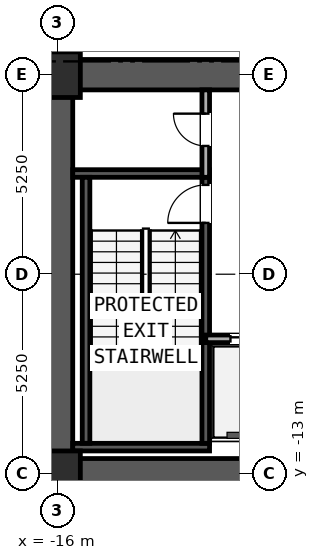
"""IFC4 building model, lengths in metres.
Left out: names, types, materials, properties, quantities, classifications, styles, units other than length and angle.
Written with IfcOpenShell. Run it as: python <this file> out.ifc"""

import sys

from ifc_helpers import new_model, si_unit, direction, frame, frame_2d, origin, origin_2d, place, context, subcontext, project, spatial, rectangle, extrude, element, fill, save


model = new_model("IFC4")
c1 = context("Model", 3, precision=1e-05, world=origin(), true_north=direction((0.0, 1.0)))
c2 = subcontext(c1, "Body", "Model", "MODEL_VIEW")
j1 = project(units=[si_unit("LENGTHUNIT", "METRE"), si_unit("PLANEANGLEUNIT", "RADIAN")], contexts=[c1])
p1 = place(None, origin())
s1 = spatial("IfcSite", under=j1, at=p1, CompositionType="ELEMENT")
p2 = place(p1, origin())
s2 = spatial("IfcBuilding", under=s1, at=p2, CompositionType="ELEMENT")
p3 = place(p2, frame((0.0, 0.0, -10.0)))
s3 = spatial("IfcBuildingStorey", under=s2, at=p3, CompositionType="ELEMENT", Elevation=-10.0)
p4 = place(p3, frame((-16.4, -13.0, 0.0), z_axis=(0.0, 0.0, 1.0), x_axis=(1.0, 0.0, 0.0)))
e1 = element("IfcWall", 1, at=p4, inside=s3, PredefinedType="SHEAR", context=c2, shape_type="SweptSolid", body=[
    extrude(rectangle(XDim=32.8, YDim=0.8, at=frame_2d((16.4, 0.0))), origin(), (0.0, 0.0, 1.0), 4.2),
])
p5 = place(p3, frame((-16.4, -2.5, 0.0), z_axis=(0.0, 0.0, 1.0), x_axis=(1.0, 0.0, 0.0)))
e2 = element("IfcWall", 2, at=p5, inside=s3, PredefinedType="SHEAR", context=c2, shape_type="SweptSolid", body=[
    extrude(rectangle(XDim=32.8, YDim=0.8, at=frame_2d((16.4, 0.0))), origin(), (0.0, 0.0, 1.0), 4.2),
])
p6 = place(p5, frame((6.025, 0.0, 0.0)))
e3 = element("IfcOpeningElement", 3, at=p6, cuts=e2, PredefinedType="OPENING", context=c2, shape_type="SweptSolid", body=[
    extrude(rectangle(XDim=1.15, YDim=2.0, at=frame_2d((0.575, 1.0))), frame((0.0, 0.41, 0.0), z_axis=(0.0, -1.0, 0.0), x_axis=(1.0, 0.0, 0.0)), (0.0, 0.0, 1.0), 0.82),
])
p7 = place(p5, frame((15.6, 0.0, 0.0)))
e4 = element("IfcOpeningElement", 4, at=p7, cuts=e2, PredefinedType="OPENING", context=c2, shape_type="SweptSolid", body=[
    extrude(rectangle(XDim=1.6, YDim=2.0, at=frame_2d((0.8, 1.0))), frame((0.0, 0.41, 0.0), z_axis=(0.0, -1.0, 0.0), x_axis=(1.0, 0.0, 0.0)), (0.0, 0.0, 1.0), 0.82),
])
p8 = place(p5, frame((25.625, 0.0, 0.0)))
e5 = element("IfcOpeningElement", 5, at=p8, cuts=e2, PredefinedType="OPENING", context=c2, shape_type="SweptSolid", body=[
    extrude(rectangle(XDim=1.15, YDim=2.0, at=frame_2d((0.575, 1.0))), frame((0.0, 0.41, 0.0), z_axis=(0.0, -1.0, 0.0), x_axis=(1.0, 0.0, 0.0)), (0.0, 0.0, 1.0), 0.82),
])
p9 = place(p3, frame((-16.0, -12.6, 0.0), z_axis=(0.0, 0.0, 1.0), x_axis=(0.0, 1.0, 0.0)))
e6 = element("IfcWall", 6, at=p9, inside=s3, PredefinedType="SHEAR", context=c2, shape_type="SweptSolid", body=[
    extrude(rectangle(XDim=9.7, YDim=0.8, at=frame_2d((4.85, 0.0))), origin(), (0.0, 0.0, 1.0), 4.2),
])
for number, where, z_axis, x_axis in (
    (7, (-15.6, -12.3, 0.0), (0.0, 0.0, 1.0), (1.0, 0.0, 0.0)),
    (8, (-15.6, -5.1, 0.0), (0.0, 0.0, 1.0), (1.0, 0.0, 0.0)),
):
    element("IfcWall", number, at=place(p3, frame(where, z_axis=z_axis, x_axis=x_axis)), inside=s3, PredefinedType="SOLIDWALL", context=c2, shape_type="SweptSolid", body=[
        extrude(rectangle(XDim=3.6, YDim=0.2, at=frame_2d((1.8, 0.0))), origin(), (0.0, 0.0, 1.0), 4.48),
    ])
p10 = place(p3, frame((-15.25, -12.2, 0.0), z_axis=(0.0, 0.0, 1.0), x_axis=(0.0, 1.0, 0.0)))
e9 = element("IfcWall", 9, at=p10, inside=s3, PredefinedType="SOLIDWALL", context=c2, shape_type="SweptSolid", body=[
    extrude(rectangle(XDim=7.0, YDim=0.2, at=frame_2d((3.5, 0.0))), origin(), (0.0, 0.0, 1.0), 4.48),
])
p11 = place(p3, frame((-12.1, -12.2, 0.0), z_axis=(0.0, 0.0, 1.0), x_axis=(0.0, 1.0, 0.0)))
e10 = element("IfcWall", 10, at=p11, inside=s3, PredefinedType="SOLIDWALL", context=c2, shape_type="SweptSolid", body=[
    extrude(rectangle(XDim=7.0, YDim=0.2, at=frame_2d((3.5, 0.0))), origin(), (0.0, 0.0, 1.0), 4.48),
])
p12 = place(p11, frame((5.8, 0.0, 0.0)))
e11 = element("IfcOpeningElement", 11, at=p12, cuts=e10, PredefinedType="OPENING", context=c2, shape_type="SweptSolid", body=[
    extrude(rectangle(XDim=1.0, YDim=2.1, at=frame_2d((0.5, 1.05))), frame((0.0, 0.11, 0.0), z_axis=(0.0, -1.0, 0.0), x_axis=(1.0, 0.0, 0.0)), (0.0, 0.0, 1.0), 0.22),
])
for number, where, z_axis, x_axis in (
    (12, (-16.0, -13.0, 0.0), (0.0, 0.0, 1.0), (1.0, 0.0, 0.0)),
    (13, (-16.0, -2.5, 0.0), (0.0, 0.0, 1.0), (1.0, 0.0, 0.0)),
):
    element("IfcColumn", number, at=place(p3, frame(where, z_axis=z_axis, x_axis=x_axis)), inside=s3, PredefinedType="COLUMN", context=c2, shape_type="SweptSolid", body=[
        extrude(rectangle(XDim=1.2, YDim=1.2, at=origin_2d()), origin(), (0.0, 0.0, 1.0), 4.8),
    ])
p13 = place(p3, frame((-12.1, -5.2, 0.0), z_axis=(0.0, 0.0, 1.0), x_axis=(0.0, 1.0, 0.0)))
e14 = element("IfcWall", 14, at=p13, inside=s3, PredefinedType="PARTITIONING", context=c2, shape_type="SweptSolid", body=[
    extrude(rectangle(XDim=2.3, YDim=0.2, at=frame_2d((1.15, 0.0))), origin(), (0.0, 0.0, 1.0), 4.48),
])
p14 = place(p13, frame((0.825, 0.0, 0.0)))
e15 = element("IfcOpeningElement", 15, at=p14, cuts=e14, PredefinedType="OPENING", context=c2, shape_type="SweptSolid", body=[
    extrude(rectangle(XDim=0.85, YDim=2.05, at=frame_2d((0.425, 1.025))), frame((0.0, 0.11, 0.0), z_axis=(0.0, -1.0, 0.0), x_axis=(1.0, 0.0, 0.0)), (0.0, 0.0, 1.0), 0.22),
])
p15 = place(p3, frame((-12.1, -9.45, 0.0), z_axis=(0.0, 0.0, 1.0), x_axis=(1.0, 0.0, 0.0)))
e16 = element("IfcWall", 16, at=p15, inside=s3, PredefinedType="PARTITIONING", context=c2, shape_type="SweptSolid", body=[
    extrude(rectangle(XDim=4.7, YDim=0.2, at=frame_2d((2.35, 0.0))), origin(), (0.0, 0.0, 1.0), 4.48),
])
p16 = place(p15, frame((0.65, 0.0, 0.0)))
e17 = element("IfcOpeningElement", 17, at=p16, cuts=e16, PredefinedType="OPENING", context=c2, shape_type="SweptSolid", body=[
    extrude(rectangle(XDim=1.1, YDim=2.2, at=frame_2d((0.55, 1.1))), frame((0.0, 0.11, 0.0), z_axis=(0.0, -1.0, 0.0), x_axis=(1.0, 0.0, 0.0)), (0.0, 0.0, 1.0), 0.22),
])
p17 = place(p15, frame((2.95, 0.0, 0.0)))
e18 = element("IfcOpeningElement", 18, at=p17, cuts=e16, PredefinedType="OPENING", context=c2, shape_type="SweptSolid", body=[
    extrude(rectangle(XDim=1.1, YDim=2.2, at=frame_2d((0.55, 1.1))), frame((0.0, 0.11, 0.0), z_axis=(0.0, -1.0, 0.0), x_axis=(1.0, 0.0, 0.0)), (0.0, 0.0, 1.0), 0.22),
])
p18 = place(p12, frame((1.0, 0.0, 0.0), z_axis=(0.0, 0.0, 1.0), x_axis=(-1.0, 0.0, 0.0)))
e19 = element("IfcDoor", 19, at=p18, inside=s3, OperationType="SINGLE_SWING_LEFT", PredefinedType="DOOR", context=c2, shape_type="SweptSolid", body=[
    extrude(rectangle(XDim=1.0, YDim=2.1, at=frame_2d((0.5, 1.05))), frame((0.0, 0.025, 0.0), z_axis=(0.0, -1.0, 0.0), x_axis=(1.0, 0.0, 0.0)), (0.0, 0.0, 1.0), 0.05),
])
fill(e11, e19)
p19 = place(p14, origin())
e20 = element("IfcDoor", 20, at=p19, inside=s3, OperationType="SINGLE_SWING_RIGHT", PredefinedType="DOOR", context=c2, shape_type="SweptSolid", body=[
    extrude(rectangle(XDim=0.85, YDim=2.05, at=frame_2d((0.425, 1.025))), frame((0.0, 0.025, 0.0), z_axis=(0.0, -1.0, 0.0), x_axis=(1.0, 0.0, 0.0)), (0.0, 0.0, 1.0), 0.05),
])
fill(e15, e20)
p20 = place(p16, origin())
e21 = element("IfcDoor", 21, at=p20, inside=s3, OperationType="SLIDING_TO_LEFT", PredefinedType="DOOR", context=c2, shape_type="SweptSolid", body=[
    extrude(rectangle(XDim=1.1, YDim=2.2, at=frame_2d((0.55, 1.1))), frame((0.0, 0.025, 0.0), z_axis=(0.0, -1.0, 0.0), x_axis=(1.0, 0.0, 0.0)), (0.0, 0.0, 1.0), 0.05),
])
fill(e17, e21)
save(model, sys.argv[1])
